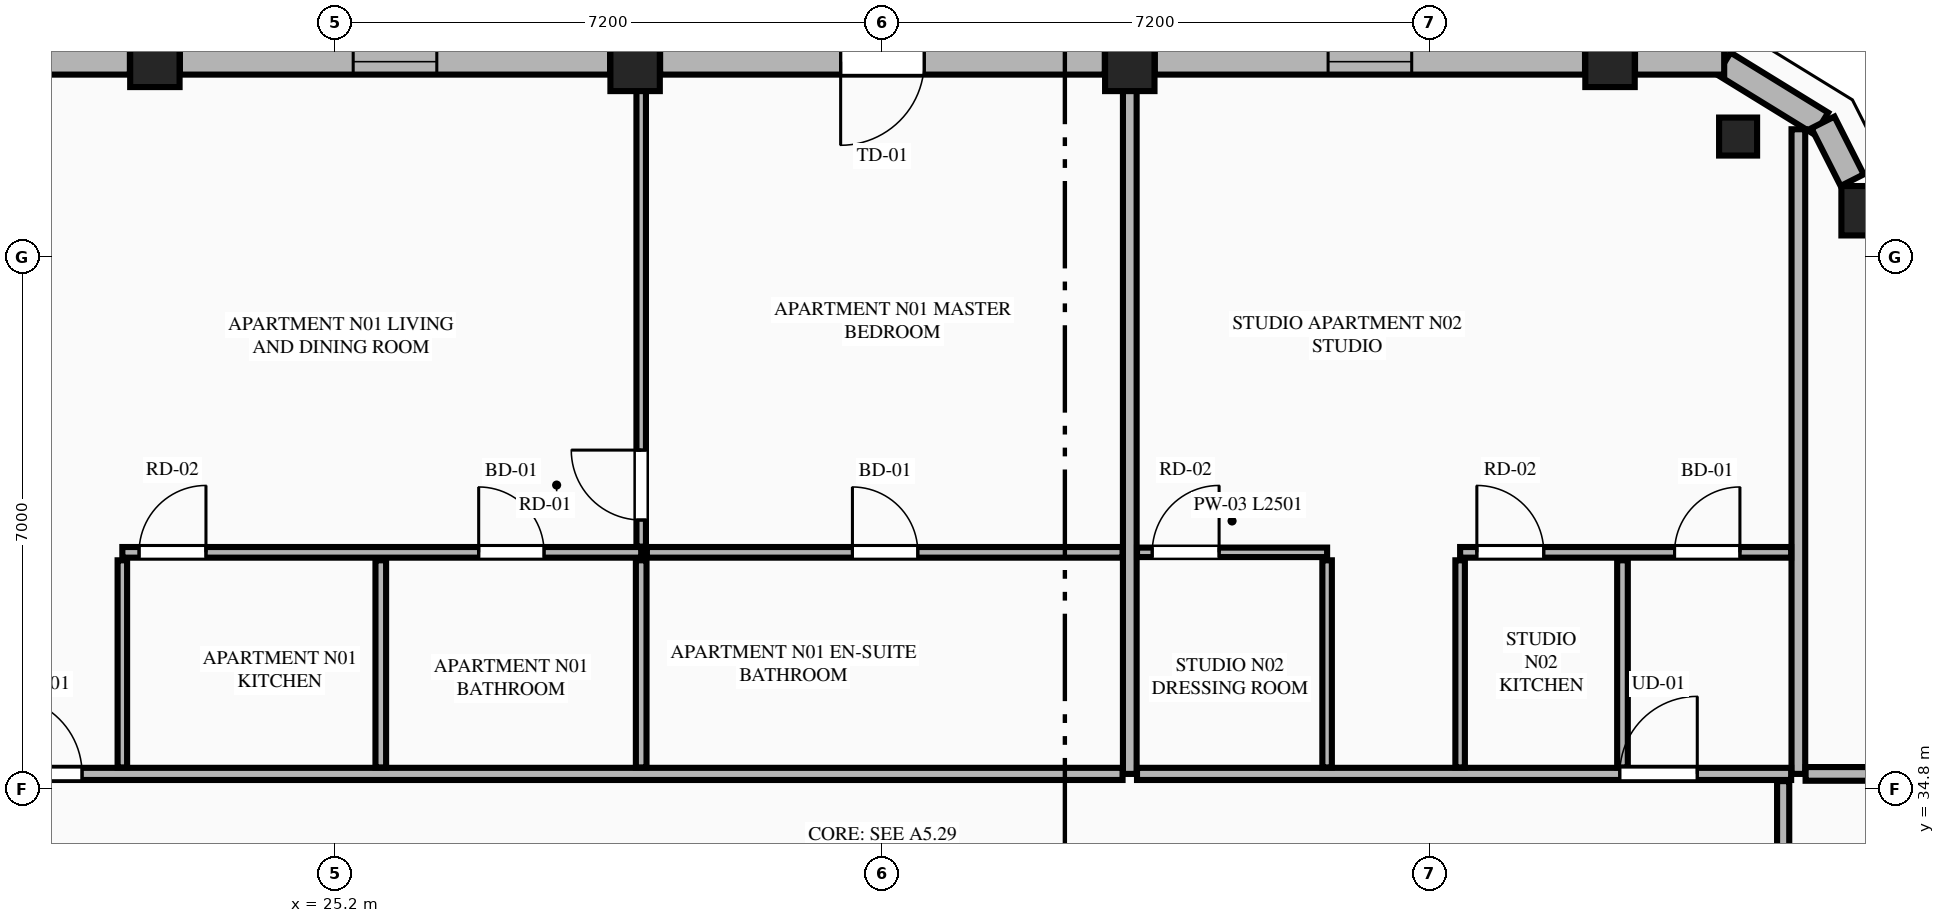
"""IFC4 building model, lengths in metres.
Left out: names, types, materials, properties, quantities, classifications, styles, units other than length and angle.
Written with IfcOpenShell. Run it as: python <this file> out.ifc"""

import sys

from ifc_helpers import new_model, si_unit, direction, frame, frame_2d, origin, origin_2d, place, context, subcontext, project, spatial, rectangle, extrude, element, fill, save


model = new_model("IFC4")
c1 = context("Model", 3, precision=1e-05, world=origin(), true_north=direction((0.0, 1.0)))
c2 = subcontext(c1, "Body", "Model", "MODEL_VIEW")
j1 = project(units=[si_unit("LENGTHUNIT", "METRE"), si_unit("PLANEANGLEUNIT", "RADIAN")], contexts=[c1])
p1 = place(None, origin())
s1 = spatial("IfcSite", under=j1, at=p1, CompositionType="ELEMENT")
p2 = place(p1, origin())
s2 = spatial("IfcBuilding", under=s1, at=p2, CompositionType="ELEMENT")
p3 = place(p2, frame((0.0, 0.0, 274.45)))
s3 = spatial("IfcBuildingStorey", under=s2, at=p3, CompositionType="ELEMENT", Elevation=274.45)
for number, where, z_axis, x_axis in (
    (1, (45.341, 42.409, 0.0), (0.0, 0.0, 1.0), (1.0, 0.0, 0.0)),
    (2, (41.972, 44.361, 0.0), (0.0, 0.0, 1.0), (1.0, 0.0, 0.0)),
    (3, (35.654, 44.308, 0.0), (0.0, 0.0, 1.0), (1.0, 0.0, 0.0)),
    (4, (29.146, 44.308, 0.0), (0.0, 0.0, 1.0), (1.0, 0.0, 0.0)),
    (5, (22.828, 44.361, 0.0), (0.0, 0.0, 1.0), (1.0, 0.0, 0.0)),
):
    element("IfcColumn", number, at=place(p3, frame(where, z_axis=z_axis, x_axis=x_axis)), inside=s3, PredefinedType="COLUMN", context=c2, shape_type="SweptSolid", body=[
        extrude(rectangle(XDim=0.65, YDim=0.65, at=origin_2d()), origin(), (0.0, 0.0, 1.0), 3.65),
    ])
p4 = place(p3, frame((43.657, 43.385, 0.0), z_axis=(0.0, 0.0, 1.0), x_axis=(-0.865256437757, 0.501329529272, 0.0)))
e6 = element("IfcColumn", 6, at=p4, inside=s3, PredefinedType="PILASTER", context=c2, shape_type="SweptSolid", body=[
    extrude(rectangle(XDim=0.5, YDim=0.35, at=origin_2d()), origin(), (0.0, 0.0, 1.0), 3.65),
])
p5 = place(p3, frame((44.753, 43.555, 0.0), z_axis=(0.0, 0.0, 1.0), x_axis=(-0.851680557619, 0.52406128246, 0.0)))
e7 = element("IfcWall", 7, at=p5, inside=s3, PredefinedType="STANDARD", context=c2, shape_type="SweptSolid", body=[
    extrude(rectangle(XDim=1.508, YDim=0.34, at=frame_2d((0.754, 0.0))), origin(), (0.0, 0.0, 1.0), 3.37),
])
p6 = place(p3, frame((45.158, 42.811, 0.0), z_axis=(0.0, 0.0, 1.0), x_axis=(-0.451907025977, 0.8920650424, 0.0)))
e8 = element("IfcWall", 8, at=p6, inside=s3, PredefinedType="STANDARD", context=c2, shape_type="SweptSolid", body=[
    extrude(rectangle(XDim=0.852, YDim=0.34, at=frame_2d((0.426, 0.0))), origin(), (0.0, 0.0, 1.0), 3.37),
])
p7 = place(p3, frame((43.474, 44.37, 0.0), z_axis=(0.0, 0.0, 1.0), x_axis=(-1.0, 0.0, 0.0)))
e9 = element("IfcWall", 9, at=p7, inside=s3, PredefinedType="STANDARD", context=c2, shape_type="SweptSolid", body=[
    extrude(rectangle(XDim=1.173, YDim=0.34, at=frame_2d((0.586, 0.0))), origin(), (0.0, 0.0, 1.0), 3.37),
])
p8 = place(p3, frame((41.643, 44.37, 0.0), z_axis=(0.0, 0.0, 1.0), x_axis=(-1.0, 0.0, 0.0)))
e10 = element("IfcWall", 10, at=p8, inside=s3, PredefinedType="STANDARD", context=c2, shape_type="SweptSolid", body=[
    extrude(rectangle(XDim=5.66, YDim=0.34, at=frame_2d((2.83, 0.0))), origin(), (0.0, 0.0, 1.0), 2.46),
])
p9 = place(p8, frame((2.28, 0.0, 0.75)))
e11 = element("IfcOpeningElement", 11, at=p9, cuts=e10, PredefinedType="OPENING", context=c2, shape_type="SweptSolid", body=[
    extrude(rectangle(XDim=1.1, YDim=1.56, at=frame_2d((0.55, 0.78))), frame((0.0, 0.18, 0.0), z_axis=(0.0, -1.0, 0.0), x_axis=(1.0, 0.0, 0.0)), (0.0, 0.0, 1.0), 0.36),
])
p10 = place(p3, frame((35.325, 44.37, 0.0), z_axis=(0.0, 0.0, 1.0), x_axis=(-1.0, 0.0, 0.0)))
e12 = element("IfcWall", 12, at=p10, inside=s3, PredefinedType="STANDARD", context=c2, shape_type="SweptSolid", body=[
    extrude(rectangle(XDim=5.85, YDim=0.34, at=frame_2d((2.925, 0.0))), origin(), (0.0, 0.0, 1.0), 2.46),
])
p11 = place(p10, frame((2.375, 0.0, 0.0)))
e13 = element("IfcOpeningElement", 13, at=p11, cuts=e12, PredefinedType="OPENING", context=c2, shape_type="SweptSolid", body=[
    extrude(rectangle(XDim=1.1, YDim=2.25, at=frame_2d((0.55, 1.125))), frame((0.0, 0.18, 0.0), z_axis=(0.0, -1.0, 0.0), x_axis=(1.0, 0.0, 0.0)), (0.0, 0.0, 1.0), 0.36),
])
p12 = place(p3, frame((28.817, 44.37, 0.0), z_axis=(0.0, 0.0, 1.0), x_axis=(-1.0, 0.0, 0.0)))
e14 = element("IfcWall", 14, at=p12, inside=s3, PredefinedType="STANDARD", context=c2, shape_type="SweptSolid", body=[
    extrude(rectangle(XDim=5.66, YDim=0.34, at=frame_2d((2.83, 0.0))), origin(), (0.0, 0.0, 1.0), 2.46),
])
p13 = place(p12, frame((2.28, 0.0, 0.75)))
e15 = element("IfcOpeningElement", 15, at=p13, cuts=e14, PredefinedType="OPENING", context=c2, shape_type="SweptSolid", body=[
    extrude(rectangle(XDim=1.1, YDim=1.56, at=frame_2d((0.55, 0.78))), frame((0.0, 0.18, 0.0), z_axis=(0.0, -1.0, 0.0), x_axis=(1.0, 0.0, 0.0)), (0.0, 0.0, 1.0), 0.36),
])
p14 = place(p3, frame((22.499, 44.37, 0.0), z_axis=(0.0, 0.0, 1.0), x_axis=(-1.0, 0.0, 0.0)))
e16 = element("IfcWall", 16, at=p14, inside=s3, PredefinedType="STANDARD", context=c2, shape_type="SweptSolid", body=[
    extrude(rectangle(XDim=1.173, YDim=0.34, at=frame_2d((0.586, 0.0))), origin(), (0.0, 0.0, 1.0), 3.37),
])
p15 = place(p3, frame((35.654, 35.0, 0.0), z_axis=(0.0, 0.0, 1.0), x_axis=(0.0, 1.0, 0.0)))
e17 = element("IfcWall", 17, at=p15, inside=s3, PredefinedType="PARTITIONING", context=c2, shape_type="SweptSolid", body=[
    extrude(rectangle(XDim=9.195, YDim=0.18, at=frame_2d((4.598, 0.0))), origin(), (0.0, 0.0, 1.0), 2.677),
])
p16 = place(p3, frame((44.45, 35.0, 0.0), z_axis=(0.0, 0.0, 1.0), x_axis=(0.0, 1.0, 0.0)))
e18 = element("IfcWall", 18, at=p16, inside=s3, PredefinedType="PARTITIONING", context=c2, shape_type="SweptSolid", body=[
    extrude(rectangle(XDim=8.481, YDim=0.18, at=frame_2d((4.24, 0.0))), origin(), (0.0, 0.0, 1.0), 3.37),
])
p17 = place(p3, frame((20.445, 35.0, 0.0), z_axis=(0.0, 0.0, 1.0), x_axis=(1.0, 0.0, 0.0)))
e19 = element("IfcWall", 19, at=p17, inside=s3, PredefinedType="PARTITIONING", context=c2, shape_type="SweptSolid", body=[
    extrude(rectangle(XDim=15.114, YDim=0.16, at=frame_2d((7.557, 0.0))), origin(), (0.0, 0.0, 1.0), 3.37),
])
p18 = place(p17, frame((0.405, 0.0, 0.0)))
e20 = element("IfcOpeningElement", 20, at=p18, cuts=e19, PredefinedType="OPENING", context=c2, shape_type="SweptSolid", body=[
    extrude(rectangle(XDim=1.02, YDim=2.25, at=frame_2d((0.51, 1.125))), frame((0.0, 0.09, 0.0), z_axis=(0.0, -1.0, 0.0), x_axis=(1.0, 0.0, 0.0)), (0.0, 0.0, 1.0), 0.18),
])
p19 = place(p3, frame((22.4, 35.085, 0.0), z_axis=(0.0, 0.0, 1.0), x_axis=(0.0, 1.0, 0.0)))
e21 = element("IfcWall", 21, at=p19, inside=s3, PredefinedType="PARTITIONING", context=c2, shape_type="SweptSolid", body=[
    extrude(rectangle(XDim=2.725, YDim=0.125, at=frame_2d((1.363, 0.0))), origin(), (0.0, 0.0, 1.0), 3.37),
])
p20 = place(p3, frame((22.4, 37.915, 0.0), z_axis=(0.0, 0.0, 1.0), x_axis=(1.0, 0.0, 0.0)))
e22 = element("IfcWall", 22, at=p20, inside=s3, PredefinedType="PLUMBINGWALL", context=c2, shape_type="SweptSolid", body=[
    extrude(rectangle(XDim=6.826, YDim=0.14, at=frame_2d((3.413, 0.0))), origin(), (0.0, 0.0, 1.0), 3.37),
])
p21 = place(p20, frame((4.688, 0.0, 0.0)))
e23 = element("IfcOpeningElement", 23, at=p21, cuts=e22, PredefinedType="OPENING", context=c2, shape_type="SweptSolid", body=[
    extrude(rectangle(XDim=0.86, YDim=2.1, at=frame_2d((0.43, 1.05))), frame((0.0, 0.08, 0.0), z_axis=(0.0, -1.0, 0.0), x_axis=(1.0, 0.0, 0.0)), (0.0, 0.0, 1.0), 0.16),
])
p22 = place(p20, frame((0.22, 0.0, 0.0)))
e24 = element("IfcOpeningElement", 24, at=p22, cuts=e22, PredefinedType="OPENING", context=c2, shape_type="SweptSolid", body=[
    extrude(rectangle(XDim=0.88, YDim=2.15, at=frame_2d((0.44, 1.075))), frame((0.0, 0.08, 0.0), z_axis=(0.0, -1.0, 0.0), x_axis=(1.0, 0.0, 0.0)), (0.0, 0.0, 1.0), 0.16),
])
p23 = place(p3, frame((29.301, 37.915, 0.0), z_axis=(0.0, 0.0, 1.0), x_axis=(1.0, 0.0, 0.0)))
e25 = element("IfcWall", 25, at=p23, inside=s3, PredefinedType="PLUMBINGWALL", context=c2, shape_type="SweptSolid", body=[
    extrude(rectangle(XDim=6.258, YDim=0.14, at=frame_2d((3.129, 0.0))), origin(), (0.0, 0.0, 1.0), 3.37),
])
p24 = place(p23, frame((2.704, 0.0, 0.0)))
e26 = element("IfcOpeningElement", 26, at=p24, cuts=e25, PredefinedType="OPENING", context=c2, shape_type="SweptSolid", body=[
    extrude(rectangle(XDim=0.86, YDim=2.1, at=frame_2d((0.43, 1.05))), frame((0.0, 0.08, 0.0), z_axis=(0.0, -1.0, 0.0), x_axis=(1.0, 0.0, 0.0)), (0.0, 0.0, 1.0), 0.16),
])
p25 = place(p3, frame((25.8, 35.085, 0.0), z_axis=(0.0, 0.0, 1.0), x_axis=(0.0, 1.0, 0.0)))
e27 = element("IfcWall", 27, at=p25, inside=s3, PredefinedType="PLUMBINGWALL", context=c2, shape_type="SweptSolid", body=[
    extrude(rectangle(XDim=2.725, YDim=0.14, at=frame_2d((1.363, 0.0))), origin(), (0.0, 0.0, 1.0), 3.37),
])
p26 = place(p3, frame((29.226, 35.085, 0.0), z_axis=(0.0, 0.0, 1.0), x_axis=(0.0, 1.0, 0.0)))
e28 = element("IfcWall", 28, at=p26, inside=s3, PredefinedType="PLUMBINGWALL", context=c2, shape_type="SweptSolid", body=[
    extrude(rectangle(XDim=2.725, YDim=0.14, at=frame_2d((1.363, 0.0))), origin(), (0.0, 0.0, 1.0), 2.677),
])
p27 = place(p3, frame((29.226, 37.99, 0.0), z_axis=(0.0, 0.0, 1.0), x_axis=(0.0, 1.0, 0.0)))
e29 = element("IfcWall", 29, at=p27, inside=s3, PredefinedType="PARTITIONING", context=c2, shape_type="SweptSolid", body=[
    extrude(rectangle(XDim=6.295, YDim=0.125, at=frame_2d((3.147, 0.0))), origin(), (0.0, 0.0, 1.0), 2.677),
])
p28 = place(p27, frame((0.35, 0.0, 0.0)))
e30 = element("IfcOpeningElement", 30, at=p28, cuts=e29, PredefinedType="OPENING", context=c2, shape_type="SweptSolid", body=[
    extrude(rectangle(XDim=0.92, YDim=2.15, at=frame_2d((0.46, 1.075))), frame((0.0, 0.073, 0.0), z_axis=(0.0, -1.0, 0.0), x_axis=(1.0, 0.0, 0.0)), (0.0, 0.0, 1.0), 0.145),
])
p29 = place(p3, frame((35.749, 35.0, 0.0), z_axis=(0.0, 0.0, 1.0), x_axis=(1.0, 0.0, 0.0)))
e31 = element("IfcWall", 31, at=p29, inside=s3, PredefinedType="PARTITIONING", context=c2, shape_type="SweptSolid", body=[
    extrude(rectangle(XDim=8.606, YDim=0.16, at=frame_2d((4.303, 0.0))), origin(), (0.0, 0.0, 1.0), 3.37),
])
p30 = place(p29, frame((6.351, 0.0, 0.0)))
e32 = element("IfcOpeningElement", 32, at=p30, cuts=e31, PredefinedType="OPENING", context=c2, shape_type="SweptSolid", body=[
    extrude(rectangle(XDim=1.02, YDim=2.25, at=frame_2d((0.51, 1.125))), frame((0.0, 0.09, 0.0), z_axis=(0.0, -1.0, 0.0), x_axis=(1.0, 0.0, 0.0)), (0.0, 0.0, 1.0), 0.18),
])
p31 = place(p3, frame((40.0, 35.085, 0.0), z_axis=(0.0, 0.0, 1.0), x_axis=(0.0, 1.0, 0.0)))
e33 = element("IfcWall", 33, at=p31, inside=s3, PredefinedType="PARTITIONING", context=c2, shape_type="SweptSolid", body=[
    extrude(rectangle(XDim=2.725, YDim=0.125, at=frame_2d((1.363, 0.0))), origin(), (0.0, 0.0, 1.0), 3.37),
])
p32 = place(p3, frame((40.0, 37.915, 0.0), z_axis=(0.0, 0.0, 1.0), x_axis=(1.0, 0.0, 0.0)))
e34 = element("IfcWall", 34, at=p32, inside=s3, PredefinedType="PLUMBINGWALL", context=c2, shape_type="SweptSolid", body=[
    extrude(rectangle(XDim=4.355, YDim=0.14, at=frame_2d((2.177, 0.0))), origin(), (0.0, 0.0, 1.0), 3.37),
])
p33 = place(p32, frame((2.821, 0.0, 0.0)))
e35 = element("IfcOpeningElement", 35, at=p33, cuts=e34, PredefinedType="OPENING", context=c2, shape_type="SweptSolid", body=[
    extrude(rectangle(XDim=0.86, YDim=2.1, at=frame_2d((0.43, 1.05))), frame((0.0, 0.08, 0.0), z_axis=(0.0, -1.0, 0.0), x_axis=(1.0, 0.0, 0.0)), (0.0, 0.0, 1.0), 0.16),
])
p34 = place(p32, frame((0.22, 0.0, 0.0)))
e36 = element("IfcOpeningElement", 36, at=p34, cuts=e34, PredefinedType="OPENING", context=c2, shape_type="SweptSolid", body=[
    extrude(rectangle(XDim=0.88, YDim=2.15, at=frame_2d((0.44, 1.075))), frame((0.0, 0.08, 0.0), z_axis=(0.0, -1.0, 0.0), x_axis=(1.0, 0.0, 0.0)), (0.0, 0.0, 1.0), 0.16),
])
p35 = place(p3, frame((42.136, 35.085, 0.0), z_axis=(0.0, 0.0, 1.0), x_axis=(0.0, 1.0, 0.0)))
e37 = element("IfcWall", 37, at=p35, inside=s3, PredefinedType="PLUMBINGWALL", context=c2, shape_type="SweptSolid", body=[
    extrude(rectangle(XDim=2.725, YDim=0.14, at=frame_2d((1.363, 0.0))), origin(), (0.0, 0.0, 1.0), 3.37),
])
p36 = place(p3, frame((38.25, 35.085, 0.0), z_axis=(0.0, 0.0, 1.0), x_axis=(0.0, 1.0, 0.0)))
e38 = element("IfcWall", 38, at=p36, inside=s3, PredefinedType="PARTITIONING", context=c2, shape_type="SweptSolid", body=[
    extrude(rectangle(XDim=2.725, YDim=0.125, at=frame_2d((1.363, 0.0))), origin(), (0.0, 0.0, 1.0), 3.37),
])
p37 = place(p3, frame((35.749, 37.915, 0.0), z_axis=(0.0, 0.0, 1.0), x_axis=(1.0, 0.0, 0.0)))
e39 = element("IfcWall", 39, at=p37, inside=s3, PredefinedType="PARTITIONING", context=c2, shape_type="SweptSolid", body=[
    extrude(rectangle(XDim=2.501, YDim=0.125, at=frame_2d((1.25, 0.0))), origin(), (0.0, 0.0, 1.0), 3.37),
])
p38 = place(p37, frame((0.2, 0.0, 0.0)))
e40 = element("IfcOpeningElement", 40, at=p38, cuts=e39, PredefinedType="OPENING", context=c2, shape_type="SweptSolid", body=[
    extrude(rectangle(XDim=0.88, YDim=2.15, at=frame_2d((0.44, 1.075))), frame((0.0, 0.073, 0.0), z_axis=(0.0, -1.0, 0.0), x_axis=(1.0, 0.0, 0.0)), (0.0, 0.0, 1.0), 0.145),
])
p39 = place(p3, frame((44.545, 35.0, 0.0), z_axis=(0.0, 0.0, 1.0), x_axis=(1.0, 0.0, 0.0)))
e41 = element("IfcWall", 41, at=p39, inside=s3, PredefinedType="PARTITIONING", context=c2, shape_type="SweptSolid", body=[
    extrude(rectangle(XDim=4.322, YDim=0.18, at=frame_2d((2.161, 0.0))), origin(), (0.0, 0.0, 1.0), 3.37),
])
p40 = place(p3, frame((44.25, 16.495, 0.0), z_axis=(0.0, 0.0, 1.0), x_axis=(0.0, 1.0, 0.0)))
e42 = element("IfcWall", 42, at=p40, inside=s3, PredefinedType="PARTITIONING", context=c2, shape_type="SweptSolid", body=[
    extrude(rectangle(XDim=18.41, YDim=0.16, at=frame_2d((9.205, 0.0))), origin(), (0.0, 0.0, 1.0), 3.057),
])
p41 = place(p40, frame((0.4, 0.0, 0.0)))
e43 = element("IfcOpeningElement", 43, at=p41, cuts=e42, PredefinedType="OPENING", context=c2, shape_type="SweptSolid", body=[
    extrude(rectangle(XDim=1.02, YDim=2.25, at=frame_2d((0.51, 1.125))), frame((0.0, 0.09, 0.0), z_axis=(0.0, -1.0, 0.0), x_axis=(1.0, 0.0, 0.0)), (0.0, 0.0, 1.0), 0.18),
])
p42 = place(p9, origin())
e44 = element("IfcWindow", 44, at=p42, inside=s3, PartitioningType="SINGLE_PANEL", PredefinedType="WINDOW", context=c2, shape_type="SweptSolid", body=[
    extrude(rectangle(XDim=1.1, YDim=1.56, at=frame_2d((0.55, 0.78))), frame((0.0, 0.03, 0.0), z_axis=(0.0, -1.0, 0.0), x_axis=(1.0, 0.0, 0.0)), (0.0, 0.0, 1.0), 0.06),
])
fill(e11, e44)
p43 = place(p11, origin())
e45 = element("IfcDoor", 45, at=p43, inside=s3, OperationType="SINGLE_SWING_RIGHT", PredefinedType="DOOR", context=c2, shape_type="SweptSolid", body=[
    extrude(rectangle(XDim=1.1, YDim=2.25, at=frame_2d((0.55, 1.125))), frame((0.0, 0.025, 0.0), z_axis=(0.0, -1.0, 0.0), x_axis=(1.0, 0.0, 0.0)), (0.0, 0.0, 1.0), 0.05),
])
fill(e13, e45)
p44 = place(p13, origin())
e46 = element("IfcWindow", 46, at=p44, inside=s3, PartitioningType="SINGLE_PANEL", PredefinedType="WINDOW", context=c2, shape_type="SweptSolid", body=[
    extrude(rectangle(XDim=1.1, YDim=1.56, at=frame_2d((0.55, 0.78))), frame((0.0, 0.03, 0.0), z_axis=(0.0, -1.0, 0.0), x_axis=(1.0, 0.0, 0.0)), (0.0, 0.0, 1.0), 0.06),
])
fill(e15, e46)
p45 = place(p21, origin())
e47 = element("IfcDoor", 47, at=p45, inside=s3, OperationType="SINGLE_SWING_LEFT", PredefinedType="DOOR", context=c2, shape_type="SweptSolid", body=[
    extrude(rectangle(XDim=0.86, YDim=2.1, at=frame_2d((0.43, 1.05))), frame((0.0, 0.025, 0.0), z_axis=(0.0, -1.0, 0.0), x_axis=(1.0, 0.0, 0.0)), (0.0, 0.0, 1.0), 0.05),
])
fill(e23, e47)
p46 = place(p24, origin())
e48 = element("IfcDoor", 48, at=p46, inside=s3, OperationType="SINGLE_SWING_LEFT", PredefinedType="DOOR", context=c2, shape_type="SweptSolid", body=[
    extrude(rectangle(XDim=0.86, YDim=2.1, at=frame_2d((0.43, 1.05))), frame((0.0, 0.025, 0.0), z_axis=(0.0, -1.0, 0.0), x_axis=(1.0, 0.0, 0.0)), (0.0, 0.0, 1.0), 0.05),
])
fill(e26, e48)
p47 = place(p18, origin())
e49 = element("IfcDoor", 49, at=p47, inside=s3, OperationType="SINGLE_SWING_LEFT", PredefinedType="DOOR", context=c2, shape_type="SweptSolid", body=[
    extrude(rectangle(XDim=1.02, YDim=2.25, at=frame_2d((0.51, 1.125))), frame((0.0, 0.025, 0.0), z_axis=(0.0, -1.0, 0.0), x_axis=(1.0, 0.0, 0.0)), (0.0, 0.0, 1.0), 0.05),
])
fill(e20, e49)
p48 = place(p22, origin())
e50 = element("IfcDoor", 50, at=p48, inside=s3, OperationType="SINGLE_SWING_RIGHT", PredefinedType="DOOR", context=c2, shape_type="SweptSolid", body=[
    extrude(rectangle(XDim=0.88, YDim=2.15, at=frame_2d((0.44, 1.075))), frame((0.0, 0.025, 0.0), z_axis=(0.0, -1.0, 0.0), x_axis=(1.0, 0.0, 0.0)), (0.0, 0.0, 1.0), 0.05),
])
fill(e24, e50)
p49 = place(p28, origin())
e51 = element("IfcDoor", 51, at=p49, inside=s3, OperationType="SINGLE_SWING_RIGHT", PredefinedType="DOOR", context=c2, shape_type="SweptSolid", body=[
    extrude(rectangle(XDim=0.92, YDim=2.15, at=frame_2d((0.46, 1.075))), frame((0.0, 0.025, 0.0), z_axis=(0.0, -1.0, 0.0), x_axis=(1.0, 0.0, 0.0)), (0.0, 0.0, 1.0), 0.05),
])
fill(e30, e51)
p50 = place(p38, origin())
e52 = element("IfcDoor", 52, at=p50, inside=s3, OperationType="SINGLE_SWING_RIGHT", PredefinedType="DOOR", context=c2, shape_type="SweptSolid", body=[
    extrude(rectangle(XDim=0.88, YDim=2.15, at=frame_2d((0.44, 1.075))), frame((0.0, 0.025, 0.0), z_axis=(0.0, -1.0, 0.0), x_axis=(1.0, 0.0, 0.0)), (0.0, 0.0, 1.0), 0.05),
])
fill(e40, e52)
p51 = place(p33, origin())
e53 = element("IfcDoor", 53, at=p51, inside=s3, OperationType="SINGLE_SWING_RIGHT", PredefinedType="DOOR", context=c2, shape_type="SweptSolid", body=[
    extrude(rectangle(XDim=0.86, YDim=2.1, at=frame_2d((0.43, 1.05))), frame((0.0, 0.025, 0.0), z_axis=(0.0, -1.0, 0.0), x_axis=(1.0, 0.0, 0.0)), (0.0, 0.0, 1.0), 0.05),
])
fill(e35, e53)
p52 = place(p30, origin())
e54 = element("IfcDoor", 54, at=p52, inside=s3, OperationType="SINGLE_SWING_RIGHT", PredefinedType="DOOR", context=c2, shape_type="SweptSolid", body=[
    extrude(rectangle(XDim=1.02, YDim=2.25, at=frame_2d((0.51, 1.125))), frame((0.0, 0.025, 0.0), z_axis=(0.0, -1.0, 0.0), x_axis=(1.0, 0.0, 0.0)), (0.0, 0.0, 1.0), 0.05),
])
fill(e32, e54)
p53 = place(p34, origin())
e55 = element("IfcDoor", 55, at=p53, inside=s3, OperationType="SINGLE_SWING_LEFT", PredefinedType="DOOR", context=c2, shape_type="SweptSolid", body=[
    extrude(rectangle(XDim=0.88, YDim=2.15, at=frame_2d((0.44, 1.075))), frame((0.0, 0.025, 0.0), z_axis=(0.0, -1.0, 0.0), x_axis=(1.0, 0.0, 0.0)), (0.0, 0.0, 1.0), 0.05),
])
fill(e36, e55)
save(model, sys.argv[1])
